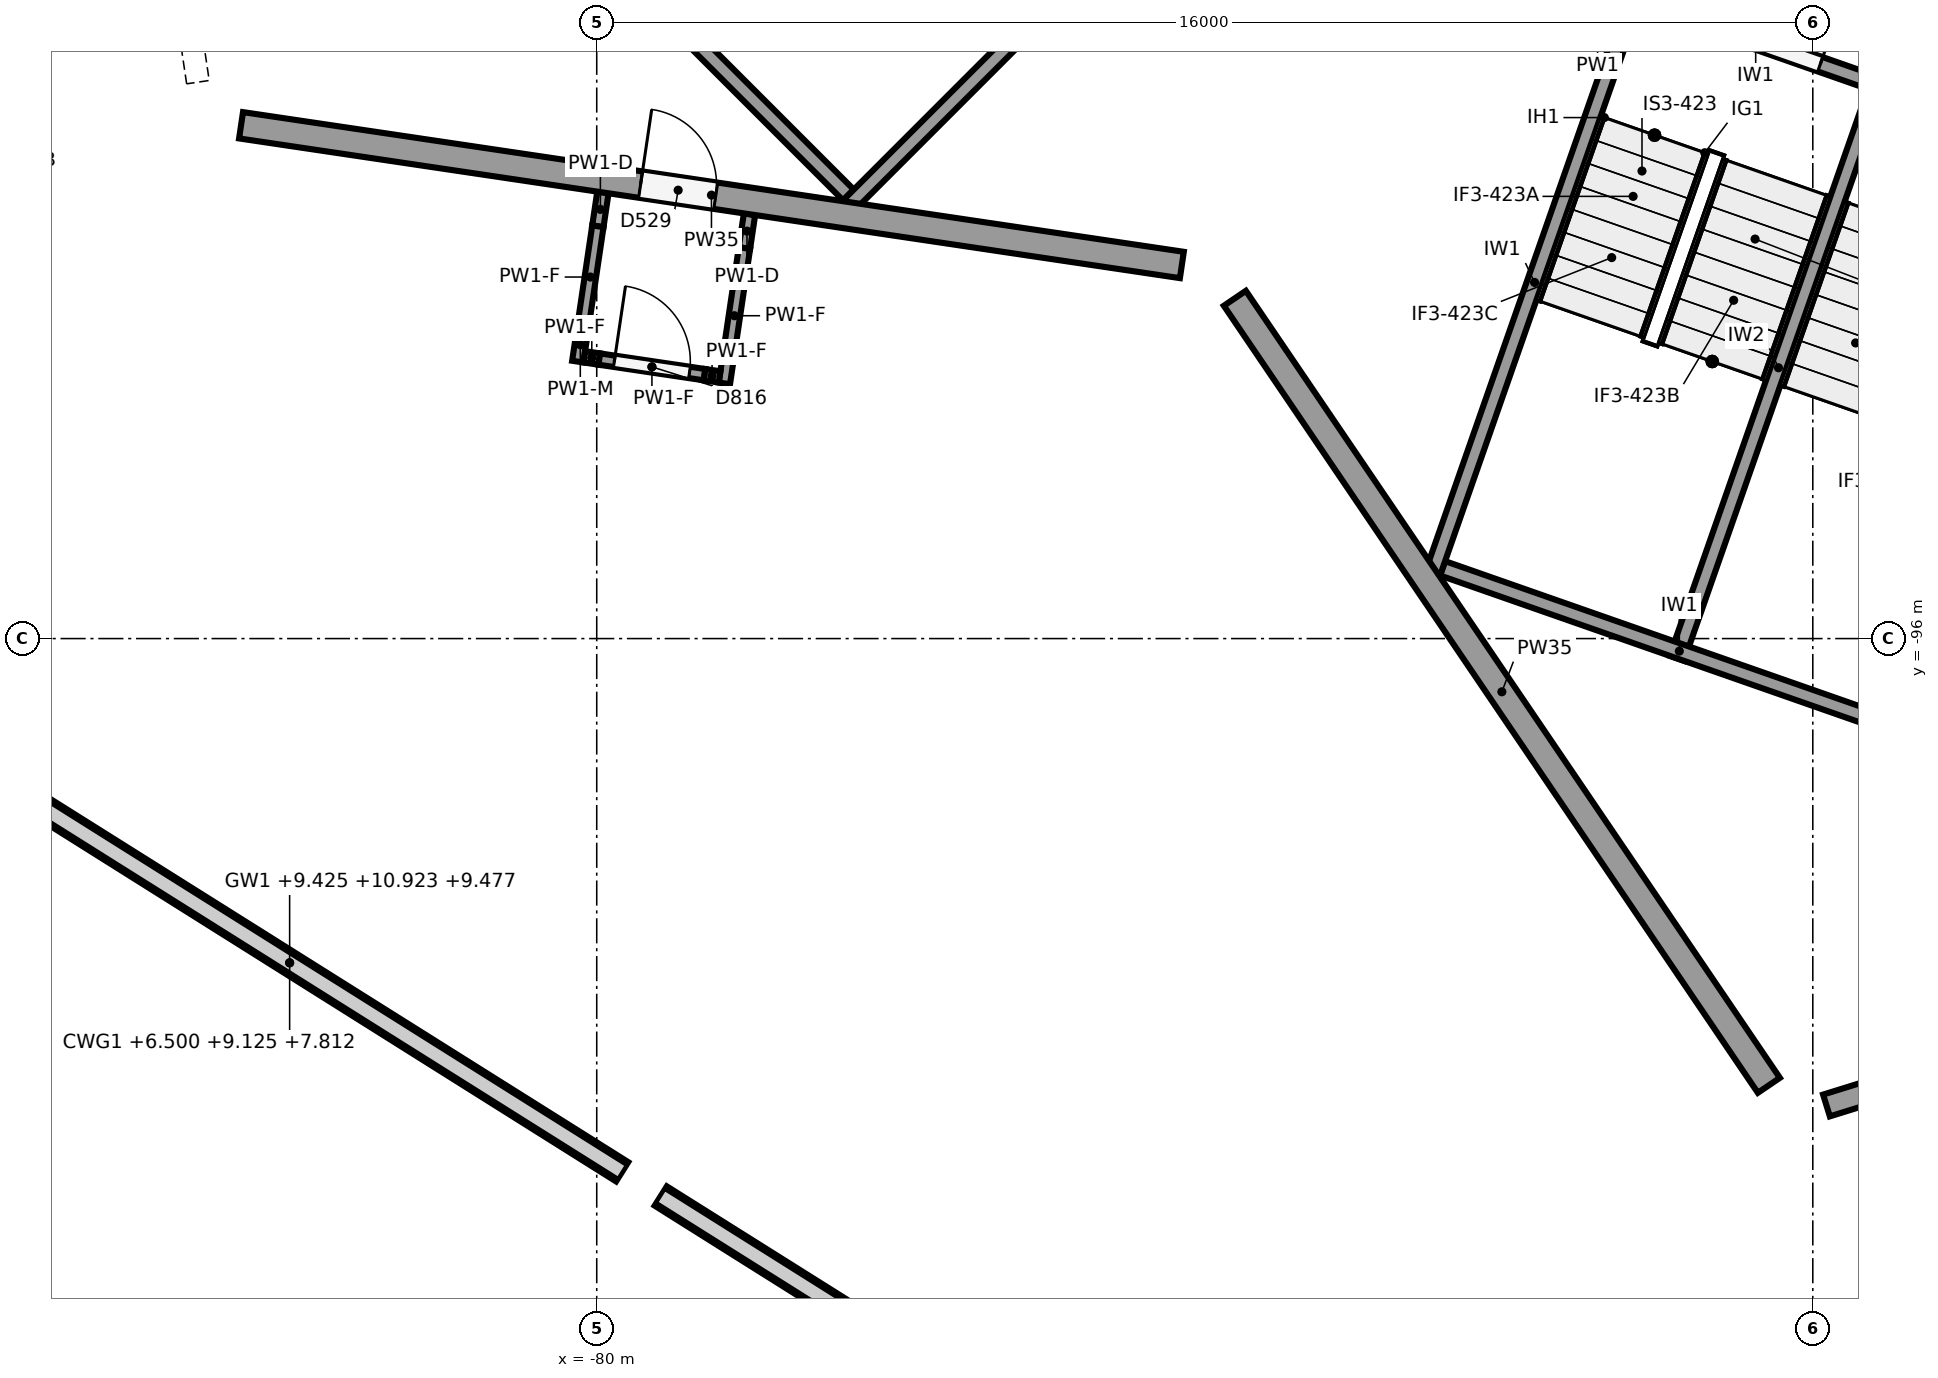
"""IFC4 building model, lengths in metres.
Left out: names, types, materials, properties, quantities, classifications, styles, units other than length and angle.
Written with IfcOpenShell. Run it as: python <this file> out.ifc"""

import sys

from ifc_helpers import new_model, si_unit, direction, frame, frame_2d, origin, origin_2d, place, context, subcontext, project, spatial, polyline, rectangle, circle, outline, extrude, element, fill, save


model = new_model("IFC4")
c1 = context("Model", 3, precision=1e-05, world=origin(), true_north=direction((0.0, 1.0)))
c2 = subcontext(c1, "Body", "Model", "MODEL_VIEW")
j1 = project(units=[si_unit("LENGTHUNIT", "METRE"), si_unit("PLANEANGLEUNIT", "RADIAN")], contexts=[c1])
p1 = place(None, origin())
s1 = spatial("IfcSite", under=j1, at=p1, CompositionType="ELEMENT")
p2 = place(p1, origin())
s2 = spatial("IfcBuilding", under=s1, at=p2, CompositionType="ELEMENT")
p3 = place(p2, frame((0.0, 0.0, 6.5)))
s3 = spatial("IfcBuildingStorey", under=s2, at=p3, CompositionType="ELEMENT", Elevation=6.5)
p4 = place(p3, frame((-85.174, -89.174, 0.0), z_axis=(0.0, 0.0, 1.0), x_axis=(1.0, 0.0, 0.0)))
e1 = element("IfcColumn", 1, at=p4, inside=s3, PredefinedType="COLUMN", context=c2, shape_type="SweptSolid", body=[
    extrude(circle(Radius=0.5, at=origin_2d()), origin(), (0.0, 0.0, 1.0), 5.5),
])
p5 = place(p3, frame((-71.857, -91.151, 0.0), z_axis=(0.0, 0.0, 1.0), x_axis=(1.0, 0.0, 0.0)))
e2 = element("IfcColumn", 2, at=p5, inside=s3, PredefinedType="COLUMN", context=c2, shape_type="SweptSolid", body=[
    extrude(circle(Radius=0.45, at=origin_2d()), origin(), (0.0, 0.0, 1.0), 5.5),
])
p6 = place(p3, frame((-64.297, -102.291, 0.0), z_axis=(0.0, 0.0, 1.0), x_axis=(1.0, 0.0, 0.0)))
e3 = element("IfcColumn", 3, at=p6, inside=s3, PredefinedType="COLUMN", context=c2, shape_type="SweptSolid", body=[
    extrude(circle(Radius=0.5, at=origin_2d()), origin(), (0.0, 0.0, 1.0), 5.5),
])
p7 = place(p3, frame((-87.427, -91.427, 0.0), z_axis=(0.0, 0.0, 1.0), x_axis=(1.0, 0.0, 0.0)))
e4 = element("IfcColumn", 4, at=p7, inside=s3, PredefinedType="COLUMN", context=c2, shape_type="SweptSolid", body=[
    extrude(circle(Radius=0.4, at=origin_2d()), origin(), (0.0, 0.0, 1.0), 5.5),
])
p8 = place(p3, frame((-82.719, -90.939, 0.0), z_axis=(0.0, 0.0, 1.0), x_axis=(1.0, 0.0, 0.0)))
e5 = element("IfcColumn", 5, at=p8, inside=s3, PredefinedType="COLUMN", context=c2, shape_type="SweptSolid", body=[
    extrude(circle(Radius=0.3, at=origin_2d()), origin(), (0.0, 0.0, 1.0), 4.41),
])
p9 = place(p3, frame((-74.836, -95.893, 0.0), z_axis=(0.0, 0.0, 1.0), x_axis=(1.0, 0.0, 0.0)))
e6 = element("IfcColumn", 6, at=p9, inside=s3, PredefinedType="COLUMN", context=c2, shape_type="SweptSolid", body=[
    extrude(circle(Radius=0.3, at=origin_2d()), origin(), (0.0, 0.0, 1.0), 3.107),
])
p10 = place(p3, frame((-66.953, -100.846, 0.0), z_axis=(0.0, 0.0, 1.0), x_axis=(1.0, 0.0, 0.0)))
e7 = element("IfcColumn", 7, at=p10, inside=s3, PredefinedType="COLUMN", context=c2, shape_type="SweptSolid", body=[
    extrude(circle(Radius=0.3, at=origin_2d()), origin(), (0.0, 0.0, 1.0), 4.41),
])
p11 = place(p3, frame((-84.463, -93.15, 0.0), z_axis=(0.0, 0.0, 1.0), x_axis=(1.0, 0.0, 0.0)))
e8 = element("IfcColumn", 8, at=p11, inside=s3, PredefinedType="COLUMN", context=c2, shape_type="SweptSolid", body=[
    extrude(circle(Radius=0.3, at=origin_2d()), origin(), (0.0, 0.0, 1.0), 4.396),
])
p12 = place(p3, frame((-80.394, -95.707, 0.0), z_axis=(0.0, 0.0, 1.0), x_axis=(1.0, 0.0, 0.0)))
e9 = element("IfcColumn", 9, at=p12, inside=s3, PredefinedType="COLUMN", context=c2, shape_type="SweptSolid", body=[
    extrude(circle(Radius=0.3, at=origin_2d()), origin(), (0.0, 0.0, 1.0), 3.723),
])
p13 = place(p3, frame((-76.326, -98.263, 0.0), z_axis=(0.0, 0.0, 1.0), x_axis=(1.0, 0.0, 0.0)))
e10 = element("IfcColumn", 10, at=p13, inside=s3, PredefinedType="COLUMN", context=c2, shape_type="SweptSolid", body=[
    extrude(circle(Radius=0.3, at=origin_2d()), origin(), (0.0, 0.0, 1.0), 3.051),
])
p14 = place(p3, frame((-72.257, -100.82, 0.0), z_axis=(0.0, 0.0, 1.0), x_axis=(1.0, 0.0, 0.0)))
e11 = element("IfcColumn", 11, at=p14, inside=s3, PredefinedType="COLUMN", context=c2, shape_type="SweptSolid", body=[
    extrude(circle(Radius=0.3, at=origin_2d()), origin(), (0.0, 0.0, 1.0), 3.723),
])
p15 = place(p3, frame((-68.189, -103.376, 0.0), z_axis=(0.0, 0.0, 1.0), x_axis=(1.0, 0.0, 0.0)))
e12 = element("IfcColumn", 12, at=p15, inside=s3, PredefinedType="COLUMN", context=c2, shape_type="SweptSolid", body=[
    extrude(circle(Radius=0.3, at=origin_2d()), origin(), (0.0, 0.0, 1.0), 4.396),
])
p16 = place(p3, frame((-86.494, -95.181, 0.0), z_axis=(0.0, 0.0, 1.0), x_axis=(1.0, 0.0, 0.0)))
e13 = element("IfcColumn", 13, at=p16, inside=s3, PredefinedType="COLUMN", context=c2, shape_type="SweptSolid", body=[
    extrude(circle(Radius=0.3, at=origin_2d()), origin(), (0.0, 0.0, 1.0), 4.429),
])
p17 = place(p3, frame((-82.155, -97.908, 0.0), z_axis=(0.0, 0.0, 1.0), x_axis=(1.0, 0.0, 0.0)))
e14 = element("IfcColumn", 14, at=p17, inside=s3, PredefinedType="COLUMN", context=c2, shape_type="SweptSolid", body=[
    extrude(circle(Radius=0.3, at=origin_2d()), origin(), (0.0, 0.0, 1.0), 3.712),
])
p18 = place(p3, frame((-77.815, -100.634, 0.0), z_axis=(0.0, 0.0, 1.0), x_axis=(1.0, 0.0, 0.0)))
e15 = element("IfcColumn", 15, at=p18, inside=s3, PredefinedType="COLUMN", context=c2, shape_type="SweptSolid", body=[
    extrude(circle(Radius=0.3, at=origin_2d()), origin(), (0.0, 0.0, 1.0), 2.995),
])
p19 = place(p3, frame((-73.477, -103.361, 0.0), z_axis=(0.0, 0.0, 1.0), x_axis=(1.0, 0.0, 0.0)))
e16 = element("IfcColumn", 16, at=p19, inside=s3, PredefinedType="COLUMN", context=c2, shape_type="SweptSolid", body=[
    extrude(circle(Radius=0.3, at=origin_2d()), origin(), (0.0, 0.0, 1.0), 3.712),
])
p20 = place(p3, frame((-79.412, -103.174, 0.0), z_axis=(0.0, 0.0, 1.0), x_axis=(1.0, 0.0, 0.0)))
e17 = element("IfcColumn", 17, at=p20, inside=s3, PredefinedType="COLUMN", context=c2, shape_type="SweptSolid", body=[
    extrude(circle(Radius=0.3, at=origin_2d()), origin(), (0.0, 0.0, 1.0), 2.935),
])
p21 = place(p3, frame((-88.415, -97.517, 2.925), z_axis=(0.0, 0.0, 1.0), x_axis=(0.846725649112, -0.532029769032, 0.0)))
e18 = element("IfcWall", 18, at=p21, inside=s3, PredefinedType="SOLIDWALL", context=c2, shape_type="SweptSolid", body=[
    extrude(outline(polyline([(0.0, 0.0), (10.334, 0.0), (10.334, 0.052), (0.0, 1.499), (0.0, 0.0)])), frame((0.0, 0.15, 0.0), z_axis=(0.0, -1.0, 0.0), x_axis=(1.0, 0.0, 0.0)), (0.0, 0.0, 1.0), 0.3),
])
p22 = place(p3, frame((-79.158, -103.334, 2.925), z_axis=(0.0, 0.0, 1.0), x_axis=(0.846732336333, -0.532019126168, 0.0)))
e19 = element("IfcWall", 19, at=p22, inside=s3, PredefinedType="SOLIDWALL", context=c2, shape_type="SweptSolid", body=[
    extrude(outline(polyline([(0.0, 0.0), (10.334, 0.0), (10.334, 1.499), (0.0, 0.052), (0.0, 0.0)])), frame((0.0, 0.15, 0.0), z_axis=(0.0, -1.0, 0.0), x_axis=(1.0, 0.0, 0.0)), (0.0, 0.0, 1.0), 0.3),
])
p23 = place(p3, frame((-85.247, -88.68, 0.0), z_axis=(0.0, 0.0, 1.0), x_axis=(-0.14684632149, 0.989159318747, 0.0)))
e20 = element("IfcWall", 20, at=p23, inside=s3, PredefinedType="SOLIDWALL", context=c2, shape_type="SweptSolid", body=[
    extrude(rectangle(XDim=12.514, YDim=0.3, at=frame_2d((6.257, 0.0))), origin(), (0.0, 0.0, 1.0), 3.85),
])
p24 = place(p3, frame((-72.301, -91.085, 0.0), z_axis=(0.0, 0.0, 1.0), x_axis=(-0.989159318747, 0.14684632149, 0.0)))
e21 = element("IfcWall", 21, at=p24, inside=s3, PredefinedType="SOLIDWALL", context=c2, shape_type="SweptSolid", body=[
    extrude(rectangle(XDim=12.514, YDim=0.35, at=frame_2d((6.257, 0.0))), origin(), (0.0, 0.0, 1.0), 3.85),
])
p25 = place(p24, frame((6.2, 0.0, 0.0)))
e22 = element("IfcOpeningElement", 22, at=p25, cuts=e21, PredefinedType="OPENING", context=c2, shape_type="SweptSolid", body=[
    extrude(rectangle(XDim=1.0, YDim=2.1, at=frame_2d((0.5, 1.05))), frame((0.0, 0.185, 0.0), z_axis=(0.0, -1.0, 0.0), x_axis=(1.0, 0.0, 0.0)), (0.0, 0.0, 1.0), 0.37),
])
p26 = place(p3, frame((-64.578, -101.877, 0.0), z_axis=(0.0, 0.0, 1.0), x_axis=(-0.561493784496, 0.827480954447, 0.0)))
e23 = element("IfcWall", 23, at=p26, inside=s3, PredefinedType="SOLIDWALL", context=c2, shape_type="SweptSolid", body=[
    extrude(rectangle(XDim=12.513, YDim=0.35, at=frame_2d((6.257, 0.0))), origin(), (0.0, 0.0, 1.0), 3.85),
])
p27 = place(p3, frame((-51.871, -98.428, 0.0), z_axis=(0.0, 0.0, 1.0), x_axis=(-0.954916036354, -0.29687600697, 0.0)))
e24 = element("IfcWall", 24, at=p27, inside=s3, PredefinedType="SOLIDWALL", context=c2, shape_type="SweptSolid", body=[
    extrude(rectangle(XDim=12.513, YDim=0.3, at=frame_2d((6.257, 0.0))), origin(), (0.0, 0.0, 1.0), 3.85),
])
p28 = place(p3, frame((-76.688, -90.305, 0.0), z_axis=(0.0, 0.0, 1.0), x_axis=(0.707106781187, 0.707106781187, 0.0)))
e25 = element("IfcWall", 25, at=p28, inside=s3, PredefinedType="SHEAR", context=c2, shape_type="SweptSolid", body=[
    extrude(rectangle(XDim=9.8, YDim=0.2, at=frame_2d((4.9, 0.0))), origin(), (0.0, 0.0, 1.0), 5.15),
])
p29 = place(p3, frame((-81.355, -85.497, 0.0), z_axis=(0.0, 0.0, 1.0), x_axis=(0.707088285305, -0.707125276584, 0.0)))
e26 = element("IfcWall", 26, at=p29, inside=s3, PredefinedType="SHEAR", context=c2, shape_type="SweptSolid", body=[
    extrude(rectangle(XDim=6.6, YDim=0.2, at=frame_2d((3.3, 0.0))), origin(), (0.0, 0.0, 1.0), 5.15),
])
p30 = place(p3, frame((-68.998, -95.137, 0.0), z_axis=(0.0, 0.0, 1.0), x_axis=(0.330263153216, 0.943888896866, 0.0)))
e27 = element("IfcWall", 27, at=p30, inside=s3, PredefinedType="SHEAR", context=c2, shape_type="SweptSolid", body=[
    extrude(rectangle(XDim=8.1, YDim=0.2, at=frame_2d((4.05, 0.0))), origin(), (0.0, 0.0, 1.0), 5.15),
])
p31 = place(p3, frame((-68.871, -95.076, 0.0), z_axis=(0.0, 0.0, 1.0), x_axis=(0.943880844925, -0.330286164688, 0.0)))
e28 = element("IfcWall", 28, at=p31, inside=s3, PredefinedType="SHEAR", context=c2, shape_type="SweptSolid", body=[
    extrude(rectangle(XDim=6.6, YDim=0.2, at=frame_2d((3.3, 0.0))), origin(), (0.0, 0.0, 1.0), 5.15),
])
p32 = place(p3, frame((-65.789, -96.26, 0.0), z_axis=(0.0, 0.0, 1.0), x_axis=(0.330280610426, 0.943882788474, 0.0)))
e29 = element("IfcWall", 29, at=p32, inside=s3, PredefinedType="SHEAR", context=c2, shape_type="SweptSolid", body=[
    extrude(rectangle(XDim=8.1, YDim=0.2, at=frame_2d((4.05, 0.0))), origin(), (0.0, 0.0, 1.0), 5.15),
])
p33 = place(p3, frame((-66.262, -87.619, 0.0), z_axis=(0.0, 0.0, 1.0), x_axis=(0.943878576031, -0.330292648585, 0.0)))
e30 = element("IfcWall", 30, at=p33, inside=s3, PredefinedType="SHEAR", context=c2, shape_type="SweptSolid", body=[
    extrude(rectangle(XDim=3.2, YDim=0.2, at=frame_2d((1.6, 0.0))), origin(), (0.0, 0.0, 1.0), 5.15),
])
p34 = place(p33, frame((0.7, 0.0, 0.0)))
e31 = element("IfcOpeningElement", 31, at=p34, cuts=e30, PredefinedType="OPENING", context=c2, shape_type="SweptSolid", body=[
    extrude(rectangle(XDim=1.8, YDim=2.1, at=frame_2d((0.9, 1.05))), frame((0.0, 0.11, 0.0), z_axis=(0.0, -1.0, 0.0), x_axis=(1.0, 0.0, 0.0)), (0.0, 0.0, 1.0), 0.22),
])
p35 = place(p3, frame((-77.99, -90.417, 0.0), z_axis=(0.0, 0.0, 1.0), x_axis=(-0.147040245885, -0.98913051014, 0.0)))
e32 = element("IfcWall", 32, at=p35, inside=s3, PredefinedType="PARTITIONING", context=c2, shape_type="SweptSolid", body=[
    extrude(rectangle(XDim=0.45, YDim=0.15, at=frame_2d((0.225, 0.0))), origin(), (0.0, 0.0, 1.0), 3.85),
])
p36 = place(p3, frame((-78.056, -90.862, 0.0), z_axis=(0.0, 0.0, 1.0), x_axis=(-0.146755111639, -0.98917285507, 0.0)))
e33 = element("IfcWall", 33, at=p36, inside=s3, PredefinedType="PARTITIONING", context=c2, shape_type="SweptSolid", body=[
    extrude(rectangle(XDim=1.8, YDim=0.15, at=frame_2d((0.9, 0.0))), origin(), (0.0, 0.0, 1.0), 5.1),
])
p37 = place(p3, frame((-79.919, -90.131, 0.0), z_axis=(0.0, 0.0, 1.0), x_axis=(-0.147040245885, -0.98913051014, 0.0)))
e34 = element("IfcWall", 34, at=p37, inside=s3, PredefinedType="PARTITIONING", context=c2, shape_type="SweptSolid", body=[
    extrude(rectangle(XDim=0.45, YDim=0.15, at=frame_2d((0.225, 0.0))), origin(), (0.0, 0.0, 1.0), 3.85),
])
p38 = place(p3, frame((-79.985, -90.576, 0.0), z_axis=(0.0, 0.0, 1.0), x_axis=(-0.146837017969, -0.989160699863, 0.0)))
e35 = element("IfcWall", 35, at=p38, inside=s3, PredefinedType="PARTITIONING", context=c2, shape_type="SweptSolid", body=[
    extrude(rectangle(XDim=1.35, YDim=0.15, at=frame_2d((0.675, 0.0))), origin(), (0.0, 0.0, 1.0), 5.1),
])
p39 = place(p3, frame((-80.183, -91.911, 0.0), z_axis=(0.0, 0.0, 1.0), x_axis=(-0.147040245885, -0.98913051014, 0.0)))
e36 = element("IfcWall", 36, at=p39, inside=s3, PredefinedType="PARTITIONING", context=c2, shape_type="SweptSolid", body=[
    extrude(rectangle(XDim=0.45, YDim=0.15, at=frame_2d((0.225, 0.0))), origin(), (0.0, 0.0, 1.0), 3.107),
])
p40 = place(p3, frame((-80.164, -92.293, 0.0), z_axis=(0.0, 0.0, 1.0), x_axis=(0.989203462354, -0.146548661089, 0.0)))
e37 = element("IfcWall", 37, at=p40, inside=s3, PredefinedType="PARTITIONING", context=c2, shape_type="SweptSolid", body=[
    extrude(rectangle(XDim=0.2, YDim=0.15, at=frame_2d((0.1, 0.0))), origin(), (0.0, 0.0, 1.0), 5.1),
])
p41 = place(p3, frame((-79.966, -92.323, 0.0), z_axis=(0.0, 0.0, 1.0), x_axis=(0.989138771508, -0.146984661446, 0.0)))
e38 = element("IfcWall", 38, at=p41, inside=s3, PredefinedType="PARTITIONING", context=c2, shape_type="SweptSolid", body=[
    extrude(rectangle(XDim=1.4, YDim=0.15, at=frame_2d((0.7, 0.0))), origin(), (0.0, 0.0, 1.0), 5.1),
])
p42 = place(p41, frame((0.2, 0.0, 0.0)))
e39 = element("IfcOpeningElement", 39, at=p42, cuts=e38, PredefinedType="OPENING", context=c2, shape_type="SweptSolid", body=[
    extrude(rectangle(XDim=1.0, YDim=2.1, at=frame_2d((0.5, 1.05))), frame((0.0, 0.085, 0.0), z_axis=(0.0, -1.0, 0.0), x_axis=(1.0, 0.0, 0.0)), (0.0, 0.0, 1.0), 0.17),
])
p43 = place(p3, frame((-78.581, -92.528, 0.0), z_axis=(0.0, 0.0, 1.0), x_axis=(0.989203462354, -0.146548661089, 0.0)))
e40 = element("IfcWall", 40, at=p43, inside=s3, PredefinedType="PARTITIONING", context=c2, shape_type="SweptSolid", body=[
    extrude(rectangle(XDim=0.2, YDim=0.15, at=frame_2d((0.1, 0.0))), origin(), (0.0, 0.0, 1.0), 5.1),
])
p44 = place(p34, origin())
e41 = element("IfcDoor", 41, at=p44, inside=s3, OperationType="DOUBLE_DOOR_SINGLE_SWING", PredefinedType="DOOR", context=c2, shape_type="SweptSolid", body=[
    extrude(rectangle(XDim=1.8, YDim=2.1, at=frame_2d((0.9, 1.05))), frame((0.0, 0.025, 0.0), z_axis=(0.0, -1.0, 0.0), x_axis=(1.0, 0.0, 0.0)), (0.0, 0.0, 1.0), 0.05),
])
fill(e31, e41)
p45 = place(p25, frame((1.0, 0.0, 0.0), z_axis=(0.0, 0.0, 1.0), x_axis=(-1.0, 0.0, 0.0)))
e42 = element("IfcDoor", 42, at=p45, inside=s3, OperationType="SINGLE_SWING_LEFT", PredefinedType="DOOR", context=c2, shape_type="SweptSolid", body=[
    extrude(rectangle(XDim=1.0, YDim=2.1, at=frame_2d((0.5, 1.05))), frame((0.0, 0.025, 0.0), z_axis=(0.0, -1.0, 0.0), x_axis=(1.0, 0.0, 0.0)), (0.0, 0.0, 1.0), 0.05),
])
fill(e22, e42)
p46 = place(p42, origin())
e43 = element("IfcDoor", 43, at=p46, inside=s3, OperationType="SINGLE_SWING_LEFT", PredefinedType="DOOR", context=c2, shape_type="SweptSolid", body=[
    extrude(rectangle(XDim=1.0, YDim=2.1, at=frame_2d((0.5, 1.05))), frame((0.0, 0.025, 0.0), z_axis=(0.0, -1.0, 0.0), x_axis=(1.0, 0.0, 0.0)), (0.0, 0.0, 1.0), 0.05),
])
fill(e39, e43)
save(model, sys.argv[1])
